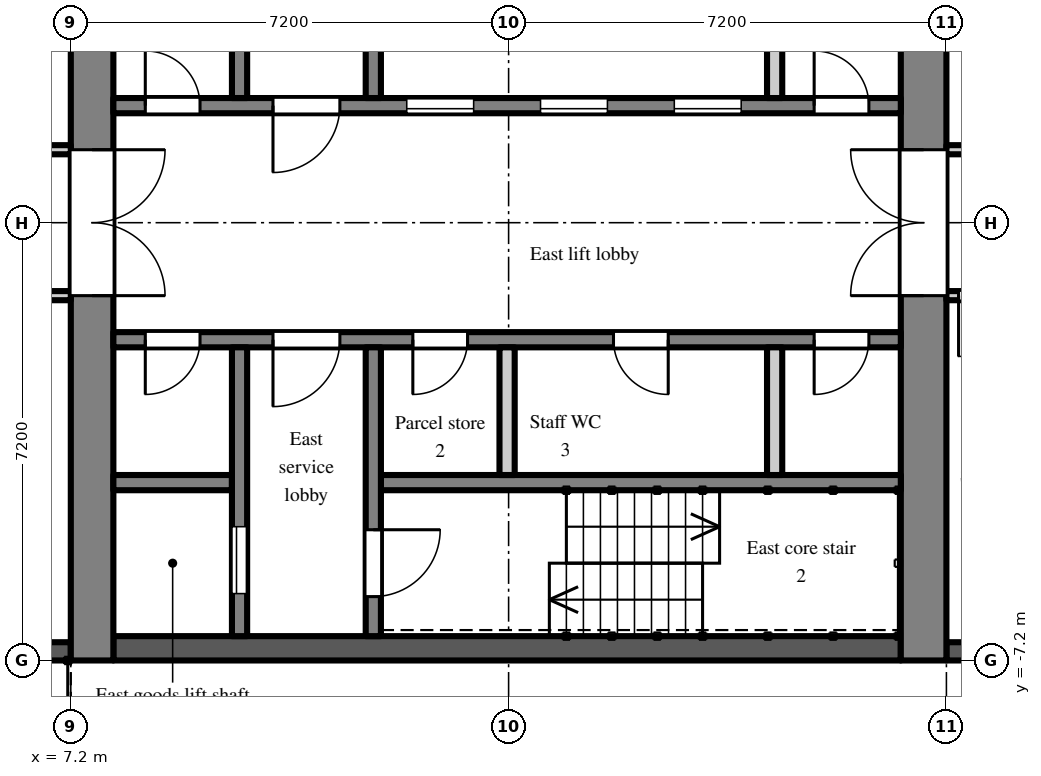
"""IFC4 building model, lengths in metres.
Left out: names, types, materials, properties, quantities, classifications, styles, units other than length and angle.
Written with IfcOpenShell. Run it as: python <this file> out.ifc"""

import sys

from ifc_helpers import new_model, si_unit, direction, frame, frame_2d, origin, place, context, subcontext, project, spatial, rectangle, extrude, element, fill, save


model = new_model("IFC4")
c1 = context("Model", 3, precision=1e-05, world=origin(), true_north=direction((0.0, 1.0)))
c2 = subcontext(c1, "Body", "Model", "MODEL_VIEW")
j1 = project(units=[si_unit("LENGTHUNIT", "METRE"), si_unit("PLANEANGLEUNIT", "RADIAN")], contexts=[c1])
p1 = place(None, origin())
s1 = spatial("IfcSite", under=j1, at=p1, CompositionType="ELEMENT")
p2 = place(p1, origin())
s2 = spatial("IfcBuilding", under=s1, at=p2, CompositionType="ELEMENT")
p3 = place(p2, frame((0.0, 0.0, 207.9)))
s3 = spatial("IfcBuildingStorey", under=s2, at=p3, CompositionType="ELEMENT", Elevation=207.9)
p4 = place(p3, frame((21.6, -7.05, 0.0), z_axis=(0.0, 0.0, 1.0), x_axis=(1.0, 0.0, 0.0)))
e1 = element("IfcWall", 1, at=p4, inside=s3, PredefinedType="SOLIDWALL", context=c2, shape_type="SweptSolid", body=[
    extrude(rectangle(XDim=2.7, YDim=0.3, at=frame_2d((1.35, 0.0))), origin(), (0.0, 0.0, 1.0), 2.3),
])
p5 = place(p4, frame((0.75, 0.0, 0.2)))
e2 = element("IfcOpeningElement", 2, at=p5, cuts=e1, PredefinedType="OPENING", context=c2, shape_type="SweptSolid", body=[
    extrude(rectangle(XDim=1.2, YDim=1.85, at=frame_2d((0.6, 0.925))), frame((0.0, 0.16, 0.0), z_axis=(0.0, -1.0, 0.0), x_axis=(1.0, 0.0, 0.0)), (0.0, 0.0, 1.0), 0.32),
])
p6 = place(p3, frame((4.2, -7.05, 0.0), z_axis=(0.0, 0.0, 1.0), x_axis=(1.0, 0.0, 0.0)))
e3 = element("IfcWall", 3, at=p6, inside=s3, PredefinedType="SOLIDWALL", context=c2, shape_type="SweptSolid", body=[
    extrude(rectangle(XDim=3.0, YDim=0.3, at=frame_2d((1.5, 0.0))), origin(), (0.0, 0.0, 1.0), 2.3),
])
p7 = place(p3, frame((7.55, -7.2, 0.0), z_axis=(0.0, 0.0, 1.0), x_axis=(0.0, 1.0, 0.0)))
e4 = element("IfcWall", 4, at=p7, inside=s3, PredefinedType="SHEAR", context=c2, shape_type="SweptSolid", body=[
    extrude(rectangle(XDim=14.4, YDim=0.7, at=frame_2d((7.2, 0.0))), origin(), (0.0, 0.0, 1.0), 2.6),
])
p8 = place(p7, frame((6.0, 0.0, 0.0)))
e5 = element("IfcOpeningElement", 5, at=p8, cuts=e4, PredefinedType="OPENING", context=c2, shape_type="SweptSolid", body=[
    extrude(rectangle(XDim=2.4, YDim=2.2, at=frame_2d((1.2, 1.1))), frame((0.0, 0.36, 0.0), z_axis=(0.0, -1.0, 0.0), x_axis=(1.0, 0.0, 0.0)), (0.0, 0.0, 1.0), 0.72),
])
p9 = place(p3, frame((21.225, -7.2, 0.0), z_axis=(0.0, 0.0, 1.0), x_axis=(0.0, 1.0, 0.0)))
e6 = element("IfcWall", 6, at=p9, inside=s3, PredefinedType="SHEAR", context=c2, shape_type="SweptSolid", body=[
    extrude(rectangle(XDim=14.4, YDim=0.75, at=frame_2d((7.2, 0.0))), origin(), (0.0, 0.0, 1.0), 2.6),
])
p10 = place(p9, frame((6.0, 0.0, 0.0)))
e7 = element("IfcOpeningElement", 7, at=p10, cuts=e6, PredefinedType="OPENING", context=c2, shape_type="SweptSolid", body=[
    extrude(rectangle(XDim=2.4, YDim=2.2, at=frame_2d((1.2, 1.1))), frame((0.0, 0.385, 0.0), z_axis=(0.0, -1.0, 0.0), x_axis=(1.0, 0.0, 0.0)), (0.0, 0.0, 1.0), 0.77),
])
p11 = place(p3, frame((7.9, 1.925, 0.0), z_axis=(0.0, 0.0, 1.0), x_axis=(1.0, 0.0, 0.0)))
e8 = element("IfcWall", 8, at=p11, inside=s3, PredefinedType="SHEAR", context=c2, shape_type="SweptSolid", body=[
    extrude(rectangle(XDim=12.95, YDim=0.25, at=frame_2d((6.475, 0.0))), origin(), (0.0, 0.0, 1.0), 2.6),
])
p12 = place(p11, frame((4.825, 0.0, 0.0)))
e9 = element("IfcOpeningElement", 9, at=p12, cuts=e8, PredefinedType="OPENING", context=c2, shape_type="SweptSolid", body=[
    extrude(rectangle(XDim=1.1, YDim=2.1, at=frame_2d((0.55, 1.05))), frame((0.0, 0.135, 0.0), z_axis=(0.0, -1.0, 0.0), x_axis=(1.0, 0.0, 0.0)), (0.0, 0.0, 1.0), 0.27),
])
p13 = place(p11, frame((7.025, 0.0, 0.0)))
e10 = element("IfcOpeningElement", 10, at=p13, cuts=e8, PredefinedType="OPENING", context=c2, shape_type="SweptSolid", body=[
    extrude(rectangle(XDim=1.1, YDim=2.1, at=frame_2d((0.55, 1.05))), frame((0.0, 0.135, 0.0), z_axis=(0.0, -1.0, 0.0), x_axis=(1.0, 0.0, 0.0)), (0.0, 0.0, 1.0), 0.27),
])
p14 = place(p11, frame((9.225, 0.0, 0.0)))
e11 = element("IfcOpeningElement", 11, at=p14, cuts=e8, PredefinedType="OPENING", context=c2, shape_type="SweptSolid", body=[
    extrude(rectangle(XDim=1.1, YDim=2.1, at=frame_2d((0.55, 1.05))), frame((0.0, 0.135, 0.0), z_axis=(0.0, -1.0, 0.0), x_axis=(1.0, 0.0, 0.0)), (0.0, 0.0, 1.0), 0.27),
])
p15 = place(p11, frame((0.525, 0.0, 0.0)))
e12 = element("IfcOpeningElement", 12, at=p15, cuts=e8, PredefinedType="OPENING", context=c2, shape_type="SweptSolid", body=[
    extrude(rectangle(XDim=0.9, YDim=2.1, at=frame_2d((0.45, 1.05))), frame((0.0, 0.135, 0.0), z_axis=(0.0, -1.0, 0.0), x_axis=(1.0, 0.0, 0.0)), (0.0, 0.0, 1.0), 0.27),
])
p16 = place(p11, frame((2.625, 0.0, 0.0)))
e13 = element("IfcOpeningElement", 13, at=p16, cuts=e8, PredefinedType="OPENING", context=c2, shape_type="SweptSolid", body=[
    extrude(rectangle(XDim=1.1, YDim=2.1, at=frame_2d((0.55, 1.05))), frame((0.0, 0.135, 0.0), z_axis=(0.0, -1.0, 0.0), x_axis=(1.0, 0.0, 0.0)), (0.0, 0.0, 1.0), 0.27),
])
p17 = place(p11, frame((11.525, 0.0, 0.0)))
e14 = element("IfcOpeningElement", 14, at=p17, cuts=e8, PredefinedType="OPENING", context=c2, shape_type="SweptSolid", body=[
    extrude(rectangle(XDim=0.9, YDim=2.1, at=frame_2d((0.45, 1.05))), frame((0.0, 0.135, 0.0), z_axis=(0.0, -1.0, 0.0), x_axis=(1.0, 0.0, 0.0)), (0.0, 0.0, 1.0), 0.27),
])
p18 = place(p3, frame((9.975, 2.05, 0.0), z_axis=(0.0, 0.0, 1.0), x_axis=(0.0, 1.0, 0.0)))
e15 = element("IfcWall", 15, at=p18, inside=s3, PredefinedType="SHEAR", context=c2, shape_type="SweptSolid", body=[
    extrude(rectangle(XDim=4.75, YDim=0.25, at=frame_2d((2.375, 0.0))), origin(), (0.0, 0.0, 1.0), 2.6),
])
p19 = place(p18, frame((2.95, 0.0, 0.0)))
e16 = element("IfcOpeningElement", 16, at=p19, cuts=e15, PredefinedType="OPENING", context=c2, shape_type="SweptSolid", body=[
    extrude(rectangle(XDim=1.1, YDim=2.1, at=frame_2d((0.55, 1.05))), frame((0.0, 0.135, 0.0), z_axis=(0.0, -1.0, 0.0), x_axis=(1.0, 0.0, 0.0)), (0.0, 0.0, 1.0), 0.27),
])
p20 = place(p3, frame((12.175, 2.05, 0.0), z_axis=(0.0, 0.0, 1.0), x_axis=(0.0, 1.0, 0.0)))
e17 = element("IfcWall", 17, at=p20, inside=s3, PredefinedType="SHEAR", context=c2, shape_type="SweptSolid", body=[
    extrude(rectangle(XDim=4.75, YDim=0.25, at=frame_2d((2.375, 0.0))), origin(), (0.0, 0.0, 1.0), 2.6),
])
p21 = place(p20, frame((3.0, 0.0, 0.0)))
e18 = element("IfcOpeningElement", 18, at=p21, cuts=e17, PredefinedType="OPENING", context=c2, shape_type="SweptSolid", body=[
    extrude(rectangle(XDim=1.1, YDim=2.1, at=frame_2d((0.55, 1.05))), frame((0.0, 0.135, 0.0), z_axis=(0.0, -1.0, 0.0), x_axis=(1.0, 0.0, 0.0)), (0.0, 0.0, 1.0), 0.27),
])
p22 = place(p3, frame((18.775, 2.05, 0.0), z_axis=(0.0, 0.0, 1.0), x_axis=(0.0, 1.0, 0.0)))
e19 = element("IfcWall", 19, at=p22, inside=s3, PredefinedType="PARTITIONING", context=c2, shape_type="SweptSolid", body=[
    extrude(rectangle(XDim=2.1, YDim=0.25, at=frame_2d((1.05, 0.0))), origin(), (0.0, 0.0, 1.0), 2.6),
])
p23 = place(p3, frame((7.9, -7.0, 0.0), z_axis=(0.0, 0.0, 1.0), x_axis=(1.0, 0.0, 0.0)))
e20 = element("IfcWall", 20, at=p23, inside=s3, PredefinedType="SHEAR", context=c2, shape_type="SweptSolid", body=[
    extrude(rectangle(XDim=12.95, YDim=0.4, at=frame_2d((6.475, 0.0))), origin(), (0.0, 0.0, 1.0), 2.6),
])
p24 = place(p3, frame((7.9, -1.925, 0.0), z_axis=(0.0, 0.0, 1.0), x_axis=(1.0, 0.0, 0.0)))
e21 = element("IfcWall", 21, at=p24, inside=s3, PredefinedType="SHEAR", context=c2, shape_type="SweptSolid", body=[
    extrude(rectangle(XDim=12.95, YDim=0.25, at=frame_2d((6.475, 0.0))), origin(), (0.0, 0.0, 1.0), 2.6),
])
p25 = place(p24, frame((0.525, 0.0, 0.0)))
e22 = element("IfcOpeningElement", 22, at=p25, cuts=e21, PredefinedType="OPENING", context=c2, shape_type="SweptSolid", body=[
    extrude(rectangle(XDim=0.9, YDim=2.1, at=frame_2d((0.45, 1.05))), frame((0.0, 0.135, 0.0), z_axis=(0.0, -1.0, 0.0), x_axis=(1.0, 0.0, 0.0)), (0.0, 0.0, 1.0), 0.27),
])
p26 = place(p24, frame((2.625, 0.0, 0.0)))
e23 = element("IfcOpeningElement", 23, at=p26, cuts=e21, PredefinedType="OPENING", context=c2, shape_type="SweptSolid", body=[
    extrude(rectangle(XDim=1.1, YDim=2.1, at=frame_2d((0.55, 1.05))), frame((0.0, 0.135, 0.0), z_axis=(0.0, -1.0, 0.0), x_axis=(1.0, 0.0, 0.0)), (0.0, 0.0, 1.0), 0.27),
])
p27 = place(p24, frame((4.925, 0.0, 0.0)))
e24 = element("IfcOpeningElement", 24, at=p27, cuts=e21, PredefinedType="OPENING", context=c2, shape_type="SweptSolid", body=[
    extrude(rectangle(XDim=0.9, YDim=2.1, at=frame_2d((0.45, 1.05))), frame((0.0, 0.135, 0.0), z_axis=(0.0, -1.0, 0.0), x_axis=(1.0, 0.0, 0.0)), (0.0, 0.0, 1.0), 0.27),
])
p28 = place(p24, frame((8.225, 0.0, 0.0)))
e25 = element("IfcOpeningElement", 25, at=p28, cuts=e21, PredefinedType="OPENING", context=c2, shape_type="SweptSolid", body=[
    extrude(rectangle(XDim=0.9, YDim=2.1, at=frame_2d((0.45, 1.05))), frame((0.0, 0.135, 0.0), z_axis=(0.0, -1.0, 0.0), x_axis=(1.0, 0.0, 0.0)), (0.0, 0.0, 1.0), 0.27),
])
p29 = place(p24, frame((11.525, 0.0, 0.0)))
e26 = element("IfcOpeningElement", 26, at=p29, cuts=e21, PredefinedType="OPENING", context=c2, shape_type="SweptSolid", body=[
    extrude(rectangle(XDim=0.9, YDim=2.1, at=frame_2d((0.45, 1.05))), frame((0.0, 0.135, 0.0), z_axis=(0.0, -1.0, 0.0), x_axis=(1.0, 0.0, 0.0)), (0.0, 0.0, 1.0), 0.27),
])
p30 = place(p3, frame((7.9, -4.275, 0.0), z_axis=(0.0, 0.0, 1.0), x_axis=(1.0, 0.0, 0.0)))
e27 = element("IfcWall", 27, at=p30, inside=s3, PredefinedType="SHEAR", context=c2, shape_type="SweptSolid", body=[
    extrude(rectangle(XDim=1.95, YDim=0.25, at=frame_2d((0.975, 0.0))), origin(), (0.0, 0.0, 1.0), 2.6),
])
p31 = place(p3, frame((12.3, -4.275, 0.0), z_axis=(0.0, 0.0, 1.0), x_axis=(1.0, 0.0, 0.0)))
e28 = element("IfcWall", 28, at=p31, inside=s3, PredefinedType="SHEAR", context=c2, shape_type="SweptSolid", body=[
    extrude(rectangle(XDim=8.55, YDim=0.25, at=frame_2d((4.275, 0.0))), origin(), (0.0, 0.0, 1.0), 2.6),
])
p32 = place(p3, frame((9.975, -2.05, 0.0), z_axis=(0.0, 0.0, 1.0), x_axis=(0.0, -1.0, 0.0)))
e29 = element("IfcWall", 29, at=p32, inside=s3, PredefinedType="SHEAR", context=c2, shape_type="SweptSolid", body=[
    extrude(rectangle(XDim=4.75, YDim=0.25, at=frame_2d((2.375, 0.0))), origin(), (0.0, 0.0, 1.0), 2.6),
])
p33 = place(p32, frame((2.95, 0.0, 0.0)))
e30 = element("IfcOpeningElement", 30, at=p33, cuts=e29, PredefinedType="OPENING", context=c2, shape_type="SweptSolid", body=[
    extrude(rectangle(XDim=1.1, YDim=2.1, at=frame_2d((0.55, 1.05))), frame((0.0, 0.135, 0.0), z_axis=(0.0, -1.0, 0.0), x_axis=(1.0, 0.0, 0.0)), (0.0, 0.0, 1.0), 0.27),
])
p34 = place(p3, frame((12.175, -2.05, 0.0), z_axis=(0.0, 0.0, 1.0), x_axis=(0.0, -1.0, 0.0)))
e31 = element("IfcWall", 31, at=p34, inside=s3, PredefinedType="SHEAR", context=c2, shape_type="SweptSolid", body=[
    extrude(rectangle(XDim=4.75, YDim=0.25, at=frame_2d((2.375, 0.0))), origin(), (0.0, 0.0, 1.0), 2.6),
])
p35 = place(p34, frame((3.0, 0.0, 0.0)))
e32 = element("IfcOpeningElement", 32, at=p35, cuts=e31, PredefinedType="OPENING", context=c2, shape_type="SweptSolid", body=[
    extrude(rectangle(XDim=1.1, YDim=2.1, at=frame_2d((0.55, 1.05))), frame((0.0, 0.135, 0.0), z_axis=(0.0, -1.0, 0.0), x_axis=(1.0, 0.0, 0.0)), (0.0, 0.0, 1.0), 0.27),
])
for number, where, z_axis, x_axis in (
    (33, (14.375, -2.05, 0.0), (0.0, 0.0, 1.0), (0.0, -1.0, 0.0)),
    (34, (18.775, -2.05, 0.0), (0.0, 0.0, 1.0), (0.0, -1.0, 0.0)),
):
    element("IfcWall", number, at=place(p3, frame(where, z_axis=z_axis, x_axis=x_axis)), inside=s3, PredefinedType="PARTITIONING", context=c2, shape_type="SweptSolid", body=[
        extrude(rectangle(XDim=2.1, YDim=0.25, at=frame_2d((1.05, 0.0))), origin(), (0.0, 0.0, 1.0), 2.6),
    ])
p36 = place(p3, frame((1.275, -1.2, 0.0), z_axis=(0.0, 0.0, 1.0), x_axis=(1.0, 0.0, 0.0)))
e35 = element("IfcWall", 35, at=p36, inside=s3, PredefinedType="PARTITIONING", context=c2, shape_type="SweptSolid", body=[
    extrude(rectangle(XDim=5.925, YDim=0.15, at=frame_2d((2.962, 0.0))), origin(), (0.0, 0.0, 1.0), 2.6),
])
p37 = place(p36, frame((3.075, 0.0, 0.0)))
e36 = element("IfcOpeningElement", 36, at=p37, cuts=e35, PredefinedType="OPENING", context=c2, shape_type="SweptSolid", body=[
    extrude(rectangle(XDim=0.9, YDim=2.1, at=frame_2d((0.45, 1.05))), frame((0.0, 0.085, 0.0), z_axis=(0.0, -1.0, 0.0), x_axis=(1.0, 0.0, 0.0)), (0.0, 0.0, 1.0), 0.17),
])
p38 = place(p3, frame((1.275, 1.2, 0.0), z_axis=(0.0, 0.0, 1.0), x_axis=(1.0, 0.0, 0.0)))
e37 = element("IfcWall", 37, at=p38, inside=s3, PredefinedType="PARTITIONING", context=c2, shape_type="SweptSolid", body=[
    extrude(rectangle(XDim=5.925, YDim=0.15, at=frame_2d((2.962, 0.0))), origin(), (0.0, 0.0, 1.0), 2.6),
])
p39 = place(p38, frame((3.475, 0.0, 0.0)))
e38 = element("IfcOpeningElement", 38, at=p39, cuts=e37, PredefinedType="OPENING", context=c2, shape_type="SweptSolid", body=[
    extrude(rectangle(XDim=0.9, YDim=2.1, at=frame_2d((0.45, 1.05))), frame((0.0, 0.085, 0.0), z_axis=(0.0, -1.0, 0.0), x_axis=(1.0, 0.0, 0.0)), (0.0, 0.0, 1.0), 0.17),
])
p40 = place(p3, frame((21.6, -1.2, 0.0), z_axis=(0.0, 0.0, 1.0), x_axis=(1.0, 0.0, 0.0)))
e39 = element("IfcWall", 39, at=p40, inside=s3, PredefinedType="PARTITIONING", context=c2, shape_type="SweptSolid", body=[
    extrude(rectangle(XDim=5.125, YDim=0.15, at=frame_2d((2.562, 0.0))), origin(), (0.0, 0.0, 1.0), 2.6),
])
p41 = place(p40, frame((0.2, 0.0, 0.0)))
e40 = element("IfcOpeningElement", 40, at=p41, cuts=e39, PredefinedType="OPENING", context=c2, shape_type="SweptSolid", body=[
    extrude(rectangle(XDim=1.0, YDim=2.1, at=frame_2d((0.5, 1.05))), frame((0.0, 0.085, 0.0), z_axis=(0.0, -1.0, 0.0), x_axis=(1.0, 0.0, 0.0)), (0.0, 0.0, 1.0), 0.17),
])
p42 = place(p3, frame((21.6, 1.2, 0.0), z_axis=(0.0, 0.0, 1.0), x_axis=(1.0, 0.0, 0.0)))
e41 = element("IfcWall", 41, at=p42, inside=s3, PredefinedType="PARTITIONING", context=c2, shape_type="SweptSolid", body=[
    extrude(rectangle(XDim=5.125, YDim=0.15, at=frame_2d((2.562, 0.0))), origin(), (0.0, 0.0, 1.0), 2.6),
])
p43 = place(p42, frame((1.35, 0.0, 0.0)))
e42 = element("IfcOpeningElement", 42, at=p43, cuts=e41, PredefinedType="OPENING", context=c2, shape_type="SweptSolid", body=[
    extrude(rectangle(XDim=0.9, YDim=2.1, at=frame_2d((0.45, 1.05))), frame((0.0, 0.085, 0.0), z_axis=(0.0, -1.0, 0.0), x_axis=(1.0, 0.0, 0.0)), (0.0, 0.0, 1.0), 0.17),
])
p44 = place(p42, frame((3.95, 0.0, 0.0)))
e43 = element("IfcOpeningElement", 43, at=p44, cuts=e41, PredefinedType="OPENING", context=c2, shape_type="SweptSolid", body=[
    extrude(rectangle(XDim=0.9, YDim=2.1, at=frame_2d((0.45, 1.05))), frame((0.0, 0.085, 0.0), z_axis=(0.0, -1.0, 0.0), x_axis=(1.0, 0.0, 0.0)), (0.0, 0.0, 1.0), 0.17),
])
p45 = place(p12, origin())
e44 = element("IfcDoor", 44, at=p45, inside=s3, OperationType="SLIDING_TO_LEFT", PredefinedType="DOOR", context=c2, shape_type="SweptSolid", body=[
    extrude(rectangle(XDim=1.1, YDim=2.1, at=frame_2d((0.55, 1.05))), frame((0.0, 0.025, 0.0), z_axis=(0.0, -1.0, 0.0), x_axis=(1.0, 0.0, 0.0)), (0.0, 0.0, 1.0), 0.05),
])
fill(e9, e44)
p46 = place(p13, origin())
e45 = element("IfcDoor", 45, at=p46, inside=s3, OperationType="SLIDING_TO_LEFT", PredefinedType="DOOR", context=c2, shape_type="SweptSolid", body=[
    extrude(rectangle(XDim=1.1, YDim=2.1, at=frame_2d((0.55, 1.05))), frame((0.0, 0.025, 0.0), z_axis=(0.0, -1.0, 0.0), x_axis=(1.0, 0.0, 0.0)), (0.0, 0.0, 1.0), 0.05),
])
fill(e10, e45)
p47 = place(p14, origin())
e46 = element("IfcDoor", 46, at=p47, inside=s3, OperationType="SLIDING_TO_LEFT", PredefinedType="DOOR", context=c2, shape_type="SweptSolid", body=[
    extrude(rectangle(XDim=1.1, YDim=2.1, at=frame_2d((0.55, 1.05))), frame((0.0, 0.025, 0.0), z_axis=(0.0, -1.0, 0.0), x_axis=(1.0, 0.0, 0.0)), (0.0, 0.0, 1.0), 0.05),
])
fill(e11, e46)
p48 = place(p33, origin())
e47 = element("IfcDoor", 47, at=p48, inside=s3, OperationType="SLIDING_TO_LEFT", PredefinedType="DOOR", context=c2, shape_type="SweptSolid", body=[
    extrude(rectangle(XDim=1.1, YDim=2.1, at=frame_2d((0.55, 1.05))), frame((0.0, 0.025, 0.0), z_axis=(0.0, -1.0, 0.0), x_axis=(1.0, 0.0, 0.0)), (0.0, 0.0, 1.0), 0.05),
])
fill(e30, e47)
p49 = place(p35, origin())
e48 = element("IfcDoor", 48, at=p49, inside=s3, OperationType="SINGLE_SWING_LEFT", PredefinedType="DOOR", context=c2, shape_type="SweptSolid", body=[
    extrude(rectangle(XDim=1.1, YDim=2.1, at=frame_2d((0.55, 1.05))), frame((0.0, 0.025, 0.0), z_axis=(0.0, -1.0, 0.0), x_axis=(1.0, 0.0, 0.0)), (0.0, 0.0, 1.0), 0.05),
])
fill(e32, e48)
p50 = place(p15, origin())
e49 = element("IfcDoor", 49, at=p50, inside=s3, OperationType="SINGLE_SWING_LEFT", PredefinedType="DOOR", context=c2, shape_type="SweptSolid", body=[
    extrude(rectangle(XDim=0.9, YDim=2.1, at=frame_2d((0.45, 1.05))), frame((0.0, 0.025, 0.0), z_axis=(0.0, -1.0, 0.0), x_axis=(1.0, 0.0, 0.0)), (0.0, 0.0, 1.0), 0.05),
])
fill(e12, e49)
p51 = place(p25, frame((0.9, 0.0, 0.0), z_axis=(0.0, 0.0, 1.0), x_axis=(-1.0, 0.0, 0.0)))
e50 = element("IfcDoor", 50, at=p51, inside=s3, OperationType="SINGLE_SWING_RIGHT", PredefinedType="DOOR", context=c2, shape_type="SweptSolid", body=[
    extrude(rectangle(XDim=0.9, YDim=2.1, at=frame_2d((0.45, 1.05))), frame((0.0, 0.025, 0.0), z_axis=(0.0, -1.0, 0.0), x_axis=(1.0, 0.0, 0.0)), (0.0, 0.0, 1.0), 0.05),
])
fill(e22, e50)
p52 = place(p16, frame((1.1, 0.0, 0.0), z_axis=(0.0, 0.0, 1.0), x_axis=(-1.0, 0.0, 0.0)))
e51 = element("IfcDoor", 51, at=p52, inside=s3, OperationType="SINGLE_SWING_RIGHT", PredefinedType="DOOR", context=c2, shape_type="SweptSolid", body=[
    extrude(rectangle(XDim=1.1, YDim=2.1, at=frame_2d((0.55, 1.05))), frame((0.0, 0.025, 0.0), z_axis=(0.0, -1.0, 0.0), x_axis=(1.0, 0.0, 0.0)), (0.0, 0.0, 1.0), 0.05),
])
fill(e13, e51)
p53 = place(p26, frame((1.1, 0.0, 0.0), z_axis=(0.0, 0.0, 1.0), x_axis=(-1.0, 0.0, 0.0)))
e52 = element("IfcDoor", 52, at=p53, inside=s3, OperationType="SINGLE_SWING_RIGHT", PredefinedType="DOOR", context=c2, shape_type="SweptSolid", body=[
    extrude(rectangle(XDim=1.1, YDim=2.1, at=frame_2d((0.55, 1.05))), frame((0.0, 0.025, 0.0), z_axis=(0.0, -1.0, 0.0), x_axis=(1.0, 0.0, 0.0)), (0.0, 0.0, 1.0), 0.05),
])
fill(e23, e52)
p54 = place(p8, frame((2.4, 0.0, 0.0), z_axis=(0.0, 0.0, 1.0), x_axis=(-1.0, 0.0, 0.0)))
e53 = element("IfcDoor", 53, at=p54, inside=s3, OperationType="DOUBLE_DOOR_DOUBLE_SWING", PredefinedType="DOOR", context=c2, shape_type="SweptSolid", body=[
    extrude(rectangle(XDim=2.4, YDim=2.2, at=frame_2d((1.2, 1.1))), frame((0.0, 0.025, 0.0), z_axis=(0.0, -1.0, 0.0), x_axis=(1.0, 0.0, 0.0)), (0.0, 0.0, 1.0), 0.05),
])
fill(e5, e53)
p55 = place(p10, origin())
e54 = element("IfcDoor", 54, at=p55, inside=s3, OperationType="DOUBLE_DOOR_DOUBLE_SWING", PredefinedType="DOOR", context=c2, shape_type="SweptSolid", body=[
    extrude(rectangle(XDim=2.4, YDim=2.2, at=frame_2d((1.2, 1.1))), frame((0.0, 0.025, 0.0), z_axis=(0.0, -1.0, 0.0), x_axis=(1.0, 0.0, 0.0)), (0.0, 0.0, 1.0), 0.05),
])
fill(e7, e54)
p56 = place(p17, origin())
e55 = element("IfcDoor", 55, at=p56, inside=s3, OperationType="SINGLE_SWING_LEFT", PredefinedType="DOOR", context=c2, shape_type="SweptSolid", body=[
    extrude(rectangle(XDim=0.9, YDim=2.1, at=frame_2d((0.45, 1.05))), frame((0.0, 0.025, 0.0), z_axis=(0.0, -1.0, 0.0), x_axis=(1.0, 0.0, 0.0)), (0.0, 0.0, 1.0), 0.05),
])
fill(e14, e55)
p57 = place(p27, frame((0.9, 0.0, 0.0), z_axis=(0.0, 0.0, 1.0), x_axis=(-1.0, 0.0, 0.0)))
e56 = element("IfcDoor", 56, at=p57, inside=s3, OperationType="SINGLE_SWING_RIGHT", PredefinedType="DOOR", context=c2, shape_type="SweptSolid", body=[
    extrude(rectangle(XDim=0.9, YDim=2.1, at=frame_2d((0.45, 1.05))), frame((0.0, 0.025, 0.0), z_axis=(0.0, -1.0, 0.0), x_axis=(1.0, 0.0, 0.0)), (0.0, 0.0, 1.0), 0.05),
])
fill(e24, e56)
p58 = place(p28, frame((0.9, 0.0, 0.0), z_axis=(0.0, 0.0, 1.0), x_axis=(-1.0, 0.0, 0.0)))
e57 = element("IfcDoor", 57, at=p58, inside=s3, OperationType="SINGLE_SWING_LEFT", PredefinedType="DOOR", context=c2, shape_type="SweptSolid", body=[
    extrude(rectangle(XDim=0.9, YDim=2.1, at=frame_2d((0.45, 1.05))), frame((0.0, 0.025, 0.0), z_axis=(0.0, -1.0, 0.0), x_axis=(1.0, 0.0, 0.0)), (0.0, 0.0, 1.0), 0.05),
])
fill(e25, e57)
p59 = place(p29, frame((0.9, 0.0, 0.0), z_axis=(0.0, 0.0, 1.0), x_axis=(-1.0, 0.0, 0.0)))
e58 = element("IfcDoor", 58, at=p59, inside=s3, OperationType="SINGLE_SWING_RIGHT", PredefinedType="DOOR", context=c2, shape_type="SweptSolid", body=[
    extrude(rectangle(XDim=0.9, YDim=2.1, at=frame_2d((0.45, 1.05))), frame((0.0, 0.025, 0.0), z_axis=(0.0, -1.0, 0.0), x_axis=(1.0, 0.0, 0.0)), (0.0, 0.0, 1.0), 0.05),
])
fill(e26, e58)
p60 = place(p41, frame((1.0, 0.0, 0.0), z_axis=(0.0, 0.0, 1.0), x_axis=(-1.0, 0.0, 0.0)))
e59 = element("IfcDoor", 59, at=p60, inside=s3, OperationType="SINGLE_SWING_RIGHT", PredefinedType="DOOR", context=c2, shape_type="SweptSolid", body=[
    extrude(rectangle(XDim=1.0, YDim=2.1, at=frame_2d((0.5, 1.05))), frame((0.0, 0.025, 0.0), z_axis=(0.0, -1.0, 0.0), x_axis=(1.0, 0.0, 0.0)), (0.0, 0.0, 1.0), 0.05),
])
fill(e40, e59)
save(model, sys.argv[1])
